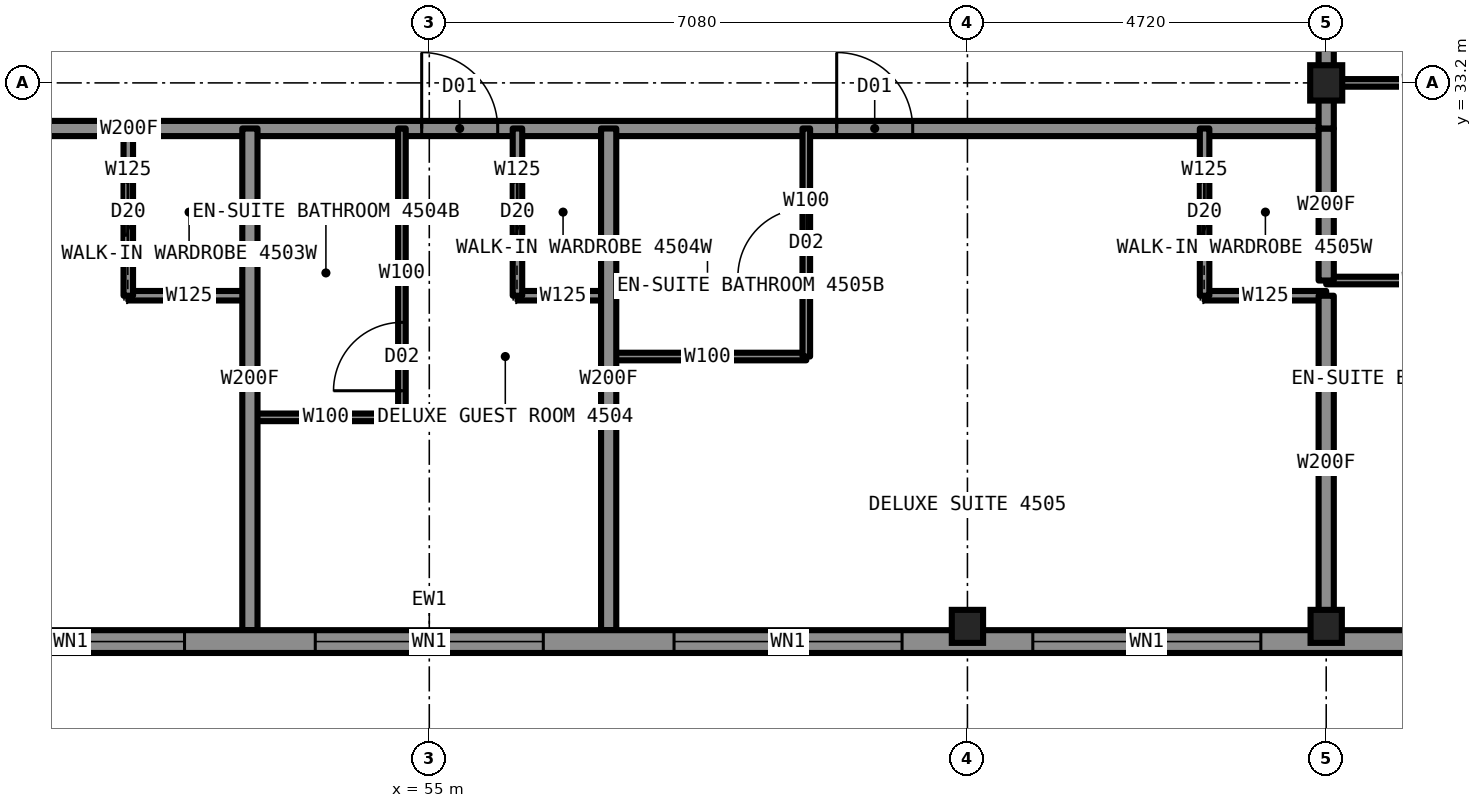
"""IFC4 building model, lengths in metres.
Left out: names, types, materials, properties, quantities, classifications, styles, units other than length and angle.
Written with IfcOpenShell. Run it as: python <this file> out.ifc"""

import sys

from ifc_helpers import new_model, si_unit, direction, frame, frame_2d, origin, origin_2d, place, context, subcontext, project, spatial, rectangle, i_section, extrude, element, fill, save


model = new_model("IFC4")
c1 = context("Model", 3, precision=1e-05, world=origin(), true_north=direction((0.0, 1.0)))
c2 = subcontext(c1, "Body", "Model", "MODEL_VIEW")
j1 = project(units=[si_unit("LENGTHUNIT", "METRE"), si_unit("PLANEANGLEUNIT", "RADIAN")], contexts=[c1])
p1 = place(None, origin())
s1 = spatial("IfcSite", under=j1, at=p1, CompositionType="ELEMENT")
p2 = place(p1, origin())
s2 = spatial("IfcBuilding", under=s1, at=p2, CompositionType="ELEMENT")
p3 = place(p2, frame((0.0, 0.0, 161.8)))
s3 = spatial("IfcBuildingStorey", under=s2, at=p3, CompositionType="ELEMENT", Elevation=161.8)
for number, where, z_axis, x_axis in (
    (1, (62.08, 26.05, 0.0), (0.0, 0.0, 1.0), (1.0, 0.0, 0.0)),
    (2, (66.8, 26.05, 0.0), (0.0, 0.0, 1.0), (1.0, 0.0, 0.0)),
):
    element("IfcColumn", number, at=place(p3, frame(where, z_axis=z_axis, x_axis=x_axis)), inside=s3, PredefinedType="COLUMN", context=c2, shape_type="SweptSolid", body=[
        extrude(i_section(OverallWidth=0.442, OverallDepth=0.531, WebThickness=0.066, FlangeThickness=0.106, at=origin_2d()), origin(), (0.0, 0.0, 1.0), 3.5),
    ])
p4 = place(p3, frame((66.8, 33.2, 0.0), z_axis=(0.0, 0.0, 1.0), x_axis=(1.0, 0.0, 0.0)))
e3 = element("IfcColumn", 3, at=p4, inside=s3, PredefinedType="COLUMN", context=c2, shape_type="SweptSolid", body=[
    extrude(i_section(OverallWidth=0.422, OverallDepth=0.465, WebThickness=0.045, FlangeThickness=0.073, at=origin_2d()), origin(), (0.0, 0.0, 1.0), 3.5),
])
p5 = place(p3, frame((66.8, 33.2, 0.0), z_axis=(0.0, 0.0, 1.0), x_axis=(1.0, 0.0, 0.0)))
e4 = element("IfcWall", 4, at=p5, inside=s3, PredefinedType="PARTITIONING", context=c2, shape_type="SweptSolid", body=[
    extrude(rectangle(XDim=2.6, YDim=0.1, at=frame_2d((1.3, 0.0))), origin(), (0.0, 0.0, 1.0), 2.573),
])
p6 = place(p3, frame((43.2, 32.6, 0.0), z_axis=(0.0, 0.0, 1.0), x_axis=(1.0, 0.0, 0.0)))
e5 = element("IfcWall", 5, at=p6, inside=s3, PredefinedType="PARTITIONING", context=c2, shape_type="SweptSolid", body=[
    extrude(rectangle(XDim=23.6, YDim=0.2, at=frame_2d((11.8, 0.0))), origin(), (0.0, 0.0, 1.0), 3.33),
])
p7 = place(p6, frame((3.0, 0.0, 0.0)))
e6 = element("IfcOpeningElement", 6, at=p7, cuts=e5, PredefinedType="OPENING", context=c2, shape_type="SweptSolid", body=[
    extrude(rectangle(XDim=1.0, YDim=2.2, at=frame_2d((0.5, 1.1))), frame((0.0, 0.11, 0.0), z_axis=(0.0, -1.0, 0.0), x_axis=(1.0, 0.0, 0.0)), (0.0, 0.0, 1.0), 0.22),
])
p8 = place(p6, frame((11.7, 0.0, 0.0)))
e7 = element("IfcOpeningElement", 7, at=p8, cuts=e5, PredefinedType="OPENING", context=c2, shape_type="SweptSolid", body=[
    extrude(rectangle(XDim=1.0, YDim=2.2, at=frame_2d((0.5, 1.1))), frame((0.0, 0.11, 0.0), z_axis=(0.0, -1.0, 0.0), x_axis=(1.0, 0.0, 0.0)), (0.0, 0.0, 1.0), 0.22),
])
p9 = place(p6, frame((17.16, 0.0, 0.0)))
e8 = element("IfcOpeningElement", 8, at=p9, cuts=e5, PredefinedType="OPENING", context=c2, shape_type="SweptSolid", body=[
    extrude(rectangle(XDim=1.0, YDim=2.2, at=frame_2d((0.5, 1.1))), frame((0.0, 0.11, 0.0), z_axis=(0.0, -1.0, 0.0), x_axis=(1.0, 0.0, 0.0)), (0.0, 0.0, 1.0), 0.22),
])
p10 = place(p3, frame((66.8, 30.6, 0.0), z_axis=(0.0, 0.0, 1.0), x_axis=(1.0, 0.0, 0.0)))
e9 = element("IfcWall", 9, at=p10, inside=s3, PredefinedType="PARTITIONING", context=c2, shape_type="SweptSolid", body=[
    extrude(rectangle(XDim=2.6, YDim=0.1, at=frame_2d((1.3, 0.0))), origin(), (0.0, 0.0, 1.0), 3.33),
])
p11 = place(p3, frame((51.04, 30.4, 0.0), z_axis=(0.0, 0.0, 1.0), x_axis=(1.0, 0.0, 0.0)))
e10 = element("IfcWall", 10, at=p11, inside=s3, PredefinedType="PARTITIONING", context=c2, shape_type="SweptSolid", body=[
    extrude(rectangle(XDim=1.6, YDim=0.125, at=frame_2d((0.8, 0.0))), origin(), (0.0, 0.0, 1.0), 3.33),
])
p12 = place(p3, frame((56.16, 30.4, 0.0), z_axis=(0.0, 0.0, 1.0), x_axis=(1.0, 0.0, 0.0)))
e11 = element("IfcWall", 11, at=p12, inside=s3, PredefinedType="PARTITIONING", context=c2, shape_type="SweptSolid", body=[
    extrude(rectangle(XDim=1.2, YDim=0.125, at=frame_2d((0.6, 0.0))), origin(), (0.0, 0.0, 1.0), 3.33),
])
p13 = place(p3, frame((65.2, 30.4, 0.0), z_axis=(0.0, 0.0, 1.0), x_axis=(1.0, 0.0, 0.0)))
e12 = element("IfcWall", 12, at=p13, inside=s3, PredefinedType="PARTITIONING", context=c2, shape_type="SweptSolid", body=[
    extrude(rectangle(XDim=1.6, YDim=0.125, at=frame_2d((0.8, 0.0))), origin(), (0.0, 0.0, 1.0), 3.33),
])
p14 = place(p3, frame((57.36, 29.6, 0.0), z_axis=(0.0, 0.0, 1.0), x_axis=(1.0, 0.0, 0.0)))
e13 = element("IfcWall", 13, at=p14, inside=s3, PredefinedType="PARTITIONING", context=c2, shape_type="SweptSolid", body=[
    extrude(rectangle(XDim=2.6, YDim=0.1, at=frame_2d((1.3, 0.0))), origin(), (0.0, 0.0, 1.0), 3.33),
])
p15 = place(p3, frame((52.64, 28.8, 0.0), z_axis=(0.0, 0.0, 1.0), x_axis=(1.0, 0.0, 0.0)))
e14 = element("IfcWall", 14, at=p15, inside=s3, PredefinedType="PARTITIONING", context=c2, shape_type="SweptSolid", body=[
    extrude(rectangle(XDim=2.0, YDim=0.1, at=frame_2d((1.0, 0.0))), origin(), (0.0, 0.0, 1.0), 3.33),
])
p16 = place(p3, frame((54.64, 28.8, 0.0), z_axis=(0.0, 0.0, 1.0), x_axis=(0.0, 1.0, 0.0)))
e15 = element("IfcWall", 15, at=p16, inside=s3, PredefinedType="PARTITIONING", context=c2, shape_type="SweptSolid", body=[
    extrude(rectangle(XDim=3.8, YDim=0.1, at=frame_2d((1.9, 0.0))), origin(), (0.0, 0.0, 1.0), 3.33),
])
p17 = place(p16, frame((0.35, 0.0, 0.0)))
e16 = element("IfcOpeningElement", 16, at=p17, cuts=e15, PredefinedType="OPENING", context=c2, shape_type="SweptSolid", body=[
    extrude(rectangle(XDim=0.9, YDim=2.1, at=frame_2d((0.45, 1.05))), frame((0.0, 0.06, 0.0), z_axis=(0.0, -1.0, 0.0), x_axis=(1.0, 0.0, 0.0)), (0.0, 0.0, 1.0), 0.12),
])
p18 = place(p3, frame((52.64, 26.0, 0.0), z_axis=(0.0, 0.0, 1.0), x_axis=(0.0, 1.0, 0.0)))
e17 = element("IfcWall", 17, at=p18, inside=s3, PredefinedType="PARTITIONING", context=c2, shape_type="SweptSolid", body=[
    extrude(rectangle(XDim=6.6, YDim=0.2, at=frame_2d((3.3, 0.0))), origin(), (0.0, 0.0, 1.0), 3.33),
])
p19 = place(p3, frame((51.04, 30.4, 0.0), z_axis=(0.0, 0.0, 1.0), x_axis=(0.0, 1.0, 0.0)))
e18 = element("IfcWall", 18, at=p19, inside=s3, PredefinedType="PARTITIONING", context=c2, shape_type="SweptSolid", body=[
    extrude(rectangle(XDim=2.2, YDim=0.125, at=frame_2d((1.1, 0.0))), origin(), (0.0, 0.0, 1.0), 3.33),
])
p20 = place(p19, frame((0.7, 0.0, 0.0)))
e19 = element("IfcOpeningElement", 19, at=p20, cuts=e18, PredefinedType="OPENING", context=c2, shape_type="SweptSolid", body=[
    extrude(rectangle(XDim=0.8, YDim=2.1, at=frame_2d((0.4, 1.05))), frame((0.0, 0.073, 0.0), z_axis=(0.0, -1.0, 0.0), x_axis=(1.0, 0.0, 0.0)), (0.0, 0.0, 1.0), 0.145),
])
p21 = place(p3, frame((56.16, 30.4, 0.0), z_axis=(0.0, 0.0, 1.0), x_axis=(0.0, 1.0, 0.0)))
e20 = element("IfcWall", 20, at=p21, inside=s3, PredefinedType="PARTITIONING", context=c2, shape_type="SweptSolid", body=[
    extrude(rectangle(XDim=2.2, YDim=0.125, at=frame_2d((1.1, 0.0))), origin(), (0.0, 0.0, 1.0), 3.33),
])
p22 = place(p21, frame((0.7, 0.0, 0.0)))
e21 = element("IfcOpeningElement", 21, at=p22, cuts=e20, PredefinedType="OPENING", context=c2, shape_type="SweptSolid", body=[
    extrude(rectangle(XDim=0.8, YDim=2.1, at=frame_2d((0.4, 1.05))), frame((0.0, 0.073, 0.0), z_axis=(0.0, -1.0, 0.0), x_axis=(1.0, 0.0, 0.0)), (0.0, 0.0, 1.0), 0.145),
])
p23 = place(p3, frame((65.2, 30.4, 0.0), z_axis=(0.0, 0.0, 1.0), x_axis=(0.0, 1.0, 0.0)))
e22 = element("IfcWall", 22, at=p23, inside=s3, PredefinedType="PARTITIONING", context=c2, shape_type="SweptSolid", body=[
    extrude(rectangle(XDim=2.2, YDim=0.125, at=frame_2d((1.1, 0.0))), origin(), (0.0, 0.0, 1.0), 3.33),
])
p24 = place(p23, frame((0.7, 0.0, 0.0)))
e23 = element("IfcOpeningElement", 23, at=p24, cuts=e22, PredefinedType="OPENING", context=c2, shape_type="SweptSolid", body=[
    extrude(rectangle(XDim=0.8, YDim=2.1, at=frame_2d((0.4, 1.05))), frame((0.0, 0.073, 0.0), z_axis=(0.0, -1.0, 0.0), x_axis=(1.0, 0.0, 0.0)), (0.0, 0.0, 1.0), 0.145),
])
p25 = place(p3, frame((66.8, 33.22, 0.0), z_axis=(0.0, 0.0, 1.0), x_axis=(0.0, 1.0, 0.0)))
e24 = element("IfcWall", 24, at=p25, inside=s3, PredefinedType="PARTITIONING", context=c2, shape_type="SweptSolid", body=[
    extrude(rectangle(XDim=23.56, YDim=0.2, at=frame_2d((11.78, 0.0))), origin(), (0.0, 0.0, 1.0), 3.33),
])
p26 = place(p25, frame((5.1, 0.0, 0.0)))
e25 = element("IfcOpeningElement", 25, at=p26, cuts=e24, PredefinedType="OPENING", context=c2, shape_type="SweptSolid", body=[
    extrude(rectangle(XDim=1.0, YDim=2.2, at=frame_2d((0.5, 1.1))), frame((0.0, 0.11, 0.0), z_axis=(0.0, -1.0, 0.0), x_axis=(1.0, 0.0, 0.0)), (0.0, 0.0, 1.0), 0.22),
])
p27 = place(p25, frame((12.42, 0.0, 0.0)))
e26 = element("IfcOpeningElement", 26, at=p27, cuts=e24, PredefinedType="OPENING", context=c2, shape_type="SweptSolid", body=[
    extrude(rectangle(XDim=1.0, YDim=2.2, at=frame_2d((0.5, 1.1))), frame((0.0, 0.11, 0.0), z_axis=(0.0, -1.0, 0.0), x_axis=(1.0, 0.0, 0.0)), (0.0, 0.0, 1.0), 0.22),
])
p28 = place(p25, frame((22.03, 0.0, 0.0)))
e27 = element("IfcOpeningElement", 27, at=p28, cuts=e24, PredefinedType="OPENING", context=c2, shape_type="SweptSolid", body=[
    extrude(rectangle(XDim=1.1, YDim=2.2, at=frame_2d((0.55, 1.1))), frame((0.0, 0.11, 0.0), z_axis=(0.0, -1.0, 0.0), x_axis=(1.0, 0.0, 0.0)), (0.0, 0.0, 1.0), 0.22),
])
p29 = place(p25, frame((0.63, 0.0, 0.0)))
e28 = element("IfcOpeningElement", 28, at=p29, cuts=e24, PredefinedType="OPENING", context=c2, shape_type="SweptSolid", body=[
    extrude(rectangle(XDim=1.1, YDim=2.2, at=frame_2d((0.55, 1.1))), frame((0.0, 0.11, 0.0), z_axis=(0.0, -1.0, 0.0), x_axis=(1.0, 0.0, 0.0)), (0.0, 0.0, 1.0), 0.22),
])
p30 = place(p3, frame((66.8, 26.0, 0.0), z_axis=(0.0, 0.0, 1.0), x_axis=(0.0, 1.0, 0.0)))
e29 = element("IfcWall", 29, at=p30, inside=s3, PredefinedType="PARTITIONING", context=c2, shape_type="SweptSolid", body=[
    extrude(rectangle(XDim=4.4, YDim=0.2, at=frame_2d((2.2, 0.0))), origin(), (0.0, 0.0, 1.0), 2.573),
])
p31 = place(p3, frame((66.8, 30.6, 0.0), z_axis=(0.0, 0.0, 1.0), x_axis=(0.0, 1.0, 0.0)))
e30 = element("IfcWall", 30, at=p31, inside=s3, PredefinedType="PARTITIONING", context=c2, shape_type="SweptSolid", body=[
    extrude(rectangle(XDim=2.0, YDim=0.2, at=frame_2d((1.0, 0.0))), origin(), (0.0, 0.0, 1.0), 2.573),
])
p32 = place(p3, frame((57.36, 26.0, 0.0), z_axis=(0.0, 0.0, 1.0), x_axis=(0.0, 1.0, 0.0)))
e31 = element("IfcWall", 31, at=p32, inside=s3, PredefinedType="PARTITIONING", context=c2, shape_type="SweptSolid", body=[
    extrude(rectangle(XDim=6.6, YDim=0.2, at=frame_2d((3.3, 0.0))), origin(), (0.0, 0.0, 1.0), 3.33),
])
p33 = place(p3, frame((59.96, 29.6, 0.0), z_axis=(0.0, 0.0, 1.0), x_axis=(0.0, 1.0, 0.0)))
e32 = element("IfcWall", 32, at=p33, inside=s3, PredefinedType="PARTITIONING", context=c2, shape_type="SweptSolid", body=[
    extrude(rectangle(XDim=3.0, YDim=0.1, at=frame_2d((1.5, 0.0))), origin(), (0.0, 0.0, 1.0), 3.33),
])
p34 = place(p33, frame((1.05, 0.0, 0.0)))
e33 = element("IfcOpeningElement", 33, at=p34, cuts=e32, PredefinedType="OPENING", context=c2, shape_type="SweptSolid", body=[
    extrude(rectangle(XDim=0.9, YDim=2.1, at=frame_2d((0.45, 1.05))), frame((0.0, 0.06, 0.0), z_axis=(0.0, -1.0, 0.0), x_axis=(1.0, 0.0, 0.0)), (0.0, 0.0, 1.0), 0.12),
])
p35 = place(p3, frame((41.2, 25.85, 0.0), z_axis=(0.0, 0.0, 1.0), x_axis=(1.0, 0.0, 0.0)))
e34 = element("IfcWall", 34, at=p35, inside=s3, PredefinedType="SOLIDWALL", context=c2, shape_type="SweptSolid", body=[
    extrude(rectangle(XDim=27.6, YDim=0.3, at=frame_2d((13.8, 0.0))), origin(), (0.0, 0.0, 1.0), 2.83),
])
p36 = place(p35, frame((2.86, 0.0, 0.3)))
e35 = element("IfcOpeningElement", 35, at=p36, cuts=e34, PredefinedType="OPENING", context=c2, shape_type="SweptSolid", body=[
    extrude(rectangle(XDim=3.0, YDim=2.0, at=frame_2d((1.5, 1.0))), frame((0.0, 0.16, 0.0), z_axis=(0.0, -1.0, 0.0), x_axis=(1.0, 0.0, 0.0)), (0.0, 0.0, 1.0), 0.32),
])
p37 = place(p35, frame((7.58, 0.0, 0.3)))
e36 = element("IfcOpeningElement", 36, at=p37, cuts=e34, PredefinedType="OPENING", context=c2, shape_type="SweptSolid", body=[
    extrude(rectangle(XDim=3.0, YDim=2.0, at=frame_2d((1.5, 1.0))), frame((0.0, 0.16, 0.0), z_axis=(0.0, -1.0, 0.0), x_axis=(1.0, 0.0, 0.0)), (0.0, 0.0, 1.0), 0.32),
])
p38 = place(p35, frame((12.3, 0.0, 0.3)))
e37 = element("IfcOpeningElement", 37, at=p38, cuts=e34, PredefinedType="OPENING", context=c2, shape_type="SweptSolid", body=[
    extrude(rectangle(XDim=3.0, YDim=2.0, at=frame_2d((1.5, 1.0))), frame((0.0, 0.16, 0.0), z_axis=(0.0, -1.0, 0.0), x_axis=(1.0, 0.0, 0.0)), (0.0, 0.0, 1.0), 0.32),
])
p39 = place(p35, frame((17.02, 0.0, 0.3)))
e38 = element("IfcOpeningElement", 38, at=p39, cuts=e34, PredefinedType="OPENING", context=c2, shape_type="SweptSolid", body=[
    extrude(rectangle(XDim=3.0, YDim=2.0, at=frame_2d((1.5, 1.0))), frame((0.0, 0.16, 0.0), z_axis=(0.0, -1.0, 0.0), x_axis=(1.0, 0.0, 0.0)), (0.0, 0.0, 1.0), 0.32),
])
p40 = place(p35, frame((21.74, 0.0, 0.3)))
e39 = element("IfcOpeningElement", 39, at=p40, cuts=e34, PredefinedType="OPENING", context=c2, shape_type="SweptSolid", body=[
    extrude(rectangle(XDim=3.0, YDim=2.0, at=frame_2d((1.5, 1.0))), frame((0.0, 0.16, 0.0), z_axis=(0.0, -1.0, 0.0), x_axis=(1.0, 0.0, 0.0)), (0.0, 0.0, 1.0), 0.32),
])
p41 = place(p3, frame((66.8, 32.6, 0.0), z_axis=(0.0, 0.0, 1.0), x_axis=(0.0, 1.0, 0.0)))
e40 = element("IfcWall", 40, at=p41, inside=s3, PredefinedType="PARTITIONING", context=c2, shape_type="SweptSolid", body=[
    extrude(rectangle(XDim=0.62, YDim=0.2, at=frame_2d((0.31, 0.0))), origin(), (0.0, 0.0, 1.0), 2.573),
])
p42 = place(p20, origin())
e41 = element("IfcDoor", 41, at=p42, inside=s3, OperationType="SLIDING_TO_LEFT", PredefinedType="DOOR", context=c2, shape_type="SweptSolid", body=[
    extrude(rectangle(XDim=0.8, YDim=2.1, at=frame_2d((0.4, 1.05))), frame((0.0, 0.025, 0.0), z_axis=(0.0, -1.0, 0.0), x_axis=(1.0, 0.0, 0.0)), (0.0, 0.0, 1.0), 0.05),
])
fill(e19, e41)
p43 = place(p8, origin())
e42 = element("IfcDoor", 42, at=p43, inside=s3, OperationType="SINGLE_SWING_LEFT", PredefinedType="DOOR", context=c2, shape_type="SweptSolid", body=[
    extrude(rectangle(XDim=1.0, YDim=2.2, at=frame_2d((0.5, 1.1))), frame((0.0, 0.025, 0.0), z_axis=(0.0, -1.0, 0.0), x_axis=(1.0, 0.0, 0.0)), (0.0, 0.0, 1.0), 0.05),
])
fill(e7, e42)
p44 = place(p17, origin())
e43 = element("IfcDoor", 43, at=p44, inside=s3, OperationType="SINGLE_SWING_RIGHT", PredefinedType="DOOR", context=c2, shape_type="SweptSolid", body=[
    extrude(rectangle(XDim=0.9, YDim=2.1, at=frame_2d((0.45, 1.05))), frame((0.0, 0.025, 0.0), z_axis=(0.0, -1.0, 0.0), x_axis=(1.0, 0.0, 0.0)), (0.0, 0.0, 1.0), 0.05),
])
fill(e16, e43)
p45 = place(p22, origin())
e44 = element("IfcDoor", 44, at=p45, inside=s3, OperationType="SLIDING_TO_LEFT", PredefinedType="DOOR", context=c2, shape_type="SweptSolid", body=[
    extrude(rectangle(XDim=0.8, YDim=2.1, at=frame_2d((0.4, 1.05))), frame((0.0, 0.025, 0.0), z_axis=(0.0, -1.0, 0.0), x_axis=(1.0, 0.0, 0.0)), (0.0, 0.0, 1.0), 0.05),
])
fill(e21, e44)
p46 = place(p9, origin())
e45 = element("IfcDoor", 45, at=p46, inside=s3, OperationType="SINGLE_SWING_LEFT", PredefinedType="DOOR", context=c2, shape_type="SweptSolid", body=[
    extrude(rectangle(XDim=1.0, YDim=2.2, at=frame_2d((0.5, 1.1))), frame((0.0, 0.025, 0.0), z_axis=(0.0, -1.0, 0.0), x_axis=(1.0, 0.0, 0.0)), (0.0, 0.0, 1.0), 0.05),
])
fill(e8, e45)
p47 = place(p34, origin())
e46 = element("IfcDoor", 46, at=p47, inside=s3, OperationType="SINGLE_SWING_RIGHT", PredefinedType="DOOR", context=c2, shape_type="SweptSolid", body=[
    extrude(rectangle(XDim=0.9, YDim=2.1, at=frame_2d((0.45, 1.05))), frame((0.0, 0.025, 0.0), z_axis=(0.0, -1.0, 0.0), x_axis=(1.0, 0.0, 0.0)), (0.0, 0.0, 1.0), 0.05),
])
fill(e33, e46)
p48 = place(p24, origin())
e47 = element("IfcDoor", 47, at=p48, inside=s3, OperationType="SLIDING_TO_LEFT", PredefinedType="DOOR", context=c2, shape_type="SweptSolid", body=[
    extrude(rectangle(XDim=0.8, YDim=2.1, at=frame_2d((0.4, 1.05))), frame((0.0, 0.025, 0.0), z_axis=(0.0, -1.0, 0.0), x_axis=(1.0, 0.0, 0.0)), (0.0, 0.0, 1.0), 0.05),
])
fill(e23, e47)
p49 = place(p37, origin())
e48 = element("IfcWindow", 48, at=p49, inside=s3, PartitioningType="SINGLE_PANEL", PredefinedType="WINDOW", context=c2, shape_type="SweptSolid", body=[
    extrude(rectangle(XDim=3.0, YDim=2.0, at=frame_2d((1.5, 1.0))), frame((0.0, 0.13, 0.0), z_axis=(0.0, -1.0, 0.0), x_axis=(1.0, 0.0, 0.0)), (0.0, 0.0, 1.0), 0.06),
])
fill(e36, e48)
p50 = place(p38, origin())
e49 = element("IfcWindow", 49, at=p50, inside=s3, PartitioningType="SINGLE_PANEL", PredefinedType="WINDOW", context=c2, shape_type="SweptSolid", body=[
    extrude(rectangle(XDim=3.0, YDim=2.0, at=frame_2d((1.5, 1.0))), frame((0.0, 0.13, 0.0), z_axis=(0.0, -1.0, 0.0), x_axis=(1.0, 0.0, 0.0)), (0.0, 0.0, 1.0), 0.06),
])
fill(e37, e49)
p51 = place(p39, origin())
e50 = element("IfcWindow", 50, at=p51, inside=s3, PartitioningType="SINGLE_PANEL", PredefinedType="WINDOW", context=c2, shape_type="SweptSolid", body=[
    extrude(rectangle(XDim=3.0, YDim=2.0, at=frame_2d((1.5, 1.0))), frame((0.0, 0.13, 0.0), z_axis=(0.0, -1.0, 0.0), x_axis=(1.0, 0.0, 0.0)), (0.0, 0.0, 1.0), 0.06),
])
fill(e38, e50)
p52 = place(p40, origin())
e51 = element("IfcWindow", 51, at=p52, inside=s3, PartitioningType="SINGLE_PANEL", PredefinedType="WINDOW", context=c2, shape_type="SweptSolid", body=[
    extrude(rectangle(XDim=3.0, YDim=2.0, at=frame_2d((1.5, 1.0))), frame((0.0, 0.13, 0.0), z_axis=(0.0, -1.0, 0.0), x_axis=(1.0, 0.0, 0.0)), (0.0, 0.0, 1.0), 0.06),
])
fill(e39, e51)
save(model, sys.argv[1])
